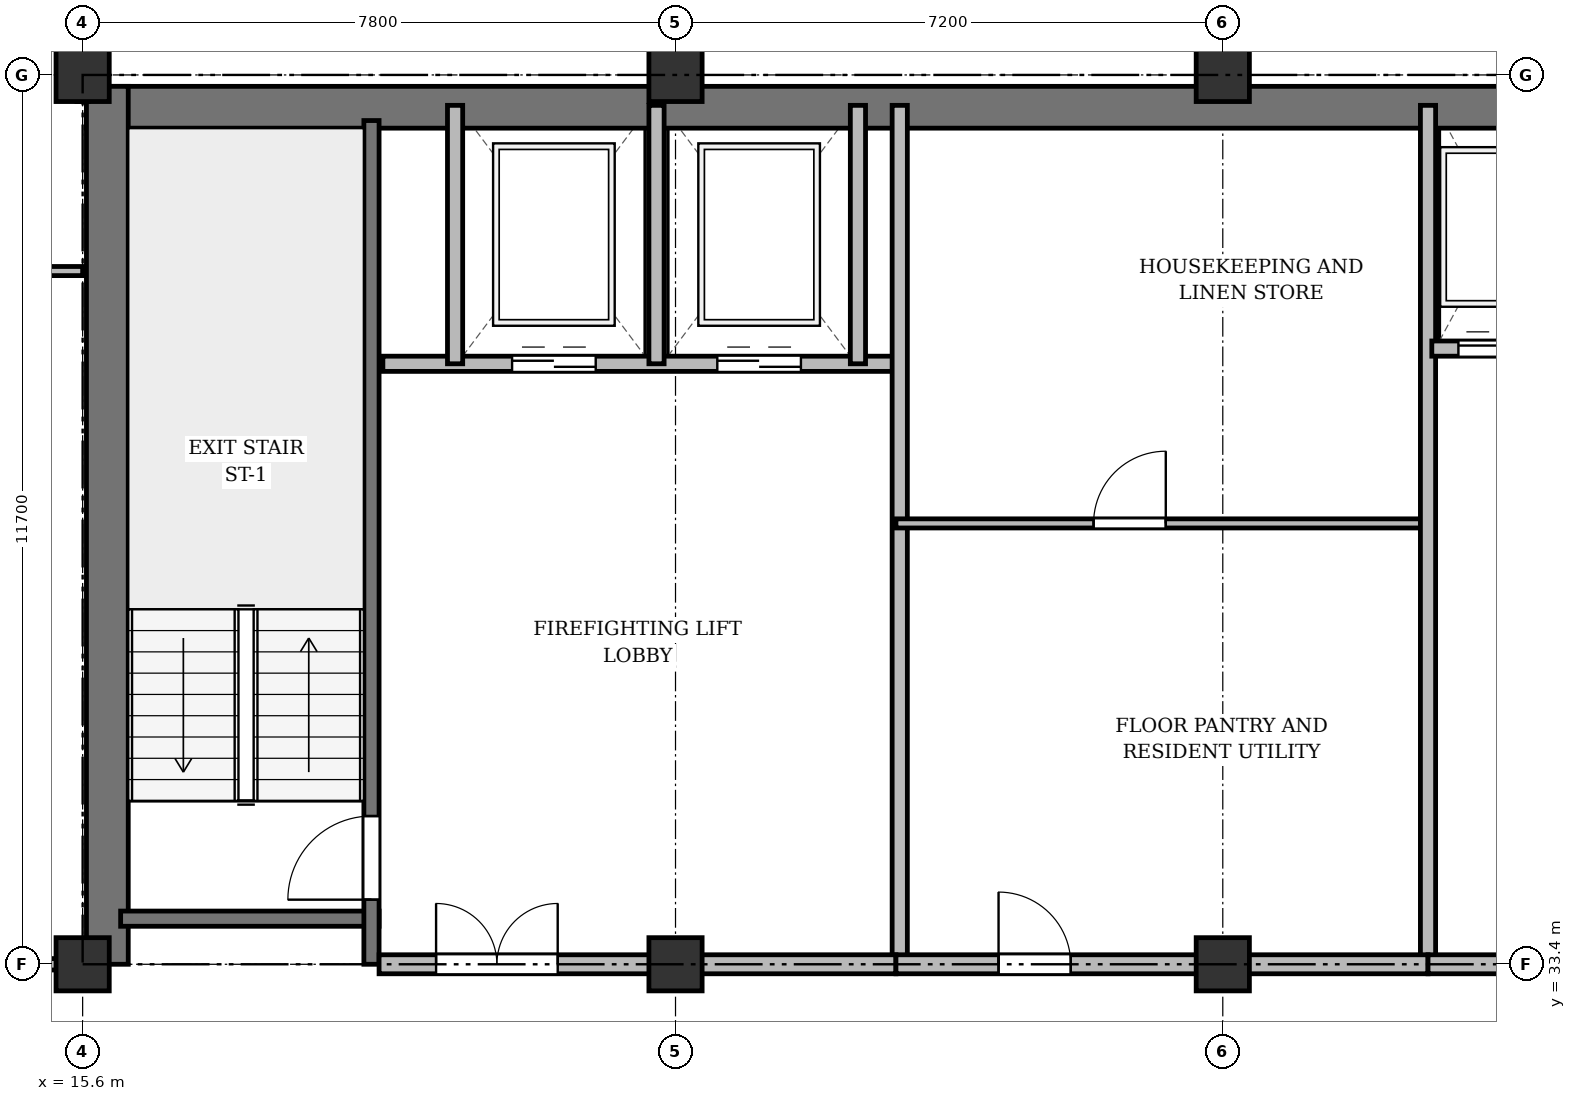
"""IFC4 building model, lengths in metres.
Left out: names, types, materials, properties, quantities, classifications, styles, units other than length and angle.
Written with IfcOpenShell. Run it as: python <this file> out.ifc"""

import sys

from ifc_helpers import new_model, si_unit, direction, frame, frame_2d, origin, origin_2d, place, context, subcontext, project, spatial, rectangle, extrude, source, transform, mapped, element, fill, save


model = new_model("IFC4")
c1 = context("Model", 3, precision=1e-05, world=origin(), true_north=direction((0.0, 1.0)))
c2 = subcontext(c1, "Body", "Model", "MODEL_VIEW")
j1 = project(units=[si_unit("LENGTHUNIT", "METRE"), si_unit("PLANEANGLEUNIT", "RADIAN")], contexts=[c1])
p1 = place(None, origin())
s1 = spatial("IfcSite", under=j1, at=p1, CompositionType="ELEMENT")
p2 = place(p1, origin())
s2 = spatial("IfcBuilding", under=s1, at=p2, CompositionType="ELEMENT")
p3 = place(p2, frame((0.0, 0.0, 197.7)))
s3 = spatial("IfcBuildingStorey", under=s2, at=p3, CompositionType="ELEMENT", Elevation=197.7)
m1 = source(origin(), c2, "Body", "SweptSolid", [
    extrude(rectangle(XDim=0.7, YDim=0.7, at=origin_2d()), origin(), (0.0, 0.0, 1.0), 3.6),
])
for number, where, z_axis, x_axis in (
    (1, (15.6, 33.4, 0.0), (0.0, 0.0, 1.0), (1.0, 0.0, 0.0)),
    (2, (15.6, 45.1, 0.0), (0.0, 0.0, 1.0), (1.0, 0.0, 0.0)),
    (3, (23.4, 33.4, 0.0), (0.0, 0.0, 1.0), (1.0, 0.0, 0.0)),
    (4, (23.4, 45.1, 0.0), (0.0, 0.0, 1.0), (1.0, 0.0, 0.0)),
    (5, (30.6, 33.4, 0.0), (0.0, 0.0, 1.0), (1.0, 0.0, 0.0)),
    (6, (30.6, 45.1, 0.0), (0.0, 0.0, 1.0), (1.0, 0.0, 0.0)),
):
    element("IfcColumn", number, at=place(p3, frame(where, z_axis=z_axis, x_axis=x_axis)), inside=s3, PredefinedType="COLUMN", context=c2, shape_type="MappedRepresentation", body=[
        mapped(m1, transform((0.0, 0.0, 0.0), x_axis=(1.0, 0.0, 0.0), y_axis=(0.0, 1.0, 0.0), z_axis=(0.0, 0.0, 1.0), scale=1.0)),
    ])
p4 = place(p3, frame((15.65, 44.675, 0.0), z_axis=(0.0, 0.0, 1.0), x_axis=(1.0, 0.0, 0.0)))
e7 = element("IfcWall", 7, at=p4, inside=s3, PredefinedType="SHEAR", context=c2, shape_type="SweptSolid", body=[
    extrude(rectangle(XDim=43.1, YDim=0.55, at=frame_2d((21.55, 0.0))), origin(), (0.0, 0.0, 1.0), 3.36),
])
p5 = place(p3, frame((15.925, 33.4, 0.0), z_axis=(0.0, 0.0, 1.0), x_axis=(0.0, 1.0, 0.0)))
e8 = element("IfcWall", 8, at=p5, inside=s3, PredefinedType="SHEAR", context=c2, shape_type="SweptSolid", body=[
    extrude(rectangle(XDim=11.55, YDim=0.55, at=frame_2d((5.775, 0.0))), origin(), (0.0, 0.0, 1.0), 3.36),
])
p6 = place(p3, frame((16.1, 34.0, 0.0), z_axis=(0.0, 0.0, 1.0), x_axis=(1.0, 0.0, 0.0)))
e9 = element("IfcWall", 9, at=p6, inside=s3, PredefinedType="SHEAR", context=c2, shape_type="SweptSolid", body=[
    extrude(rectangle(XDim=3.4, YDim=0.2, at=frame_2d((1.7, 0.0))), origin(), (0.0, 0.0, 1.0), 3.36),
])
p7 = place(p3, frame((19.4, 33.4, 0.0), z_axis=(0.0, 0.0, 1.0), x_axis=(0.0, 1.0, 0.0)))
e10 = element("IfcWall", 10, at=p7, inside=s3, PredefinedType="SHEAR", context=c2, shape_type="SweptSolid", body=[
    extrude(rectangle(XDim=11.1, YDim=0.2, at=frame_2d((5.55, 0.0))), origin(), (0.0, 0.0, 1.0), 3.36),
])
p8 = place(p7, frame((0.85, 0.0, 0.0)))
e11 = element("IfcOpeningElement", 11, at=p8, cuts=e10, PredefinedType="OPENING", context=c2, shape_type="SweptSolid", body=[
    extrude(rectangle(XDim=1.1, YDim=2.15, at=frame_2d((0.55, 1.075))), frame((0.0, 0.11, 0.0), z_axis=(0.0, -1.0, 0.0), x_axis=(1.0, 0.0, 0.0)), (0.0, 0.0, 1.0), 0.22),
])
p9 = place(p3, frame((19.55, 41.3, 0.0), z_axis=(0.0, 0.0, 1.0), x_axis=(1.0, 0.0, 0.0)))
e12 = element("IfcWall", 12, at=p9, inside=s3, PredefinedType="SOLIDWALL", context=c2, shape_type="SweptSolid", body=[
    extrude(rectangle(XDim=6.75, YDim=0.2, at=frame_2d((3.375, 0.0))), origin(), (0.0, 0.0, 1.0), 3.36),
])
p10 = place(p9, frame((1.7, 0.0, 0.0)))
e13 = element("IfcOpeningElement", 13, at=p10, cuts=e12, PredefinedType="OPENING", context=c2, shape_type="SweptSolid", body=[
    extrude(rectangle(XDim=1.1, YDim=2.15, at=frame_2d((0.55, 1.075))), frame((0.0, 0.11, 0.0), z_axis=(0.0, -1.0, 0.0), x_axis=(1.0, 0.0, 0.0)), (0.0, 0.0, 1.0), 0.22),
])
p11 = place(p9, frame((4.4, 0.0, 0.0)))
e14 = element("IfcOpeningElement", 14, at=p11, cuts=e12, PredefinedType="OPENING", context=c2, shape_type="SweptSolid", body=[
    extrude(rectangle(XDim=1.1, YDim=2.15, at=frame_2d((0.55, 1.075))), frame((0.0, 0.11, 0.0), z_axis=(0.0, -1.0, 0.0), x_axis=(1.0, 0.0, 0.0)), (0.0, 0.0, 1.0), 0.22),
])
for number, where, z_axis, x_axis in (
    (15, (20.5, 41.3, 0.0), (0.0, 0.0, 1.0), (0.0, 1.0, 0.0)),
    (16, (23.15, 41.3, 0.0), (0.0, 0.0, 1.0), (0.0, 1.0, 0.0)),
    (17, (25.8, 41.3, 0.0), (0.0, 0.0, 1.0), (0.0, 1.0, 0.0)),
):
    element("IfcWall", number, at=place(p3, frame(where, z_axis=z_axis, x_axis=x_axis)), inside=s3, PredefinedType="SOLIDWALL", context=c2, shape_type="SweptSolid", body=[
        extrude(rectangle(XDim=3.4, YDim=0.2, at=frame_2d((1.7, 0.0))), origin(), (0.0, 0.0, 1.0), 3.36),
    ])
p12 = place(p3, frame((26.35, 33.4, 0.0), z_axis=(0.0, 0.0, 1.0), x_axis=(0.0, 1.0, 0.0)))
e18 = element("IfcWall", 18, at=p12, inside=s3, PredefinedType="SOLIDWALL", context=c2, shape_type="SweptSolid", body=[
    extrude(rectangle(XDim=11.3, YDim=0.2, at=frame_2d((5.65, 0.0))), origin(), (0.0, 0.0, 1.0), 2.91),
])
p13 = place(p3, frame((19.5, 33.4, 0.0), z_axis=(0.0, 0.0, 1.0), x_axis=(1.0, 0.0, 0.0)))
e19 = element("IfcWall", 19, at=p13, inside=s3, PredefinedType="PARTITIONING", context=c2, shape_type="SweptSolid", body=[
    extrude(rectangle(XDim=6.8, YDim=0.25, at=frame_2d((3.4, 0.0))), origin(), (0.0, 0.0, 1.0), 2.91),
])
p14 = place(p13, frame((0.75, 0.0, 0.0)))
e20 = element("IfcOpeningElement", 20, at=p14, cuts=e19, PredefinedType="OPENING", context=c2, shape_type="SweptSolid", body=[
    extrude(rectangle(XDim=1.6, YDim=2.2, at=frame_2d((0.8, 1.1))), frame((0.0, 0.135, 0.0), z_axis=(0.0, -1.0, 0.0), x_axis=(1.0, 0.0, 0.0)), (0.0, 0.0, 1.0), 0.27),
])
p15 = place(p3, frame((26.3, 39.2, 0.0), z_axis=(0.0, 0.0, 1.0), x_axis=(1.0, 0.0, 0.0)))
e21 = element("IfcWall", 21, at=p15, inside=s3, PredefinedType="PARTITIONING", context=c2, shape_type="SweptSolid", body=[
    extrude(rectangle(XDim=7.0, YDim=0.12, at=frame_2d((3.5, 0.0))), origin(), (0.0, 0.0, 1.0), 2.86),
])
p16 = place(p15, frame((2.6, 0.0, 0.0)))
e22 = element("IfcOpeningElement", 22, at=p16, cuts=e21, PredefinedType="OPENING", context=c2, shape_type="SweptSolid", body=[
    extrude(rectangle(XDim=0.95, YDim=2.15, at=frame_2d((0.475, 1.075))), frame((0.0, 0.07, 0.0), z_axis=(0.0, -1.0, 0.0), x_axis=(1.0, 0.0, 0.0)), (0.0, 0.0, 1.0), 0.14),
])
p17 = place(p3, frame((33.3, 33.4, 0.0), z_axis=(0.0, 0.0, 1.0), x_axis=(0.0, 1.0, 0.0)))
e23 = element("IfcWall", 23, at=p17, inside=s3, PredefinedType="SOLIDWALL", context=c2, shape_type="SweptSolid", body=[
    extrude(rectangle(XDim=11.3, YDim=0.2, at=frame_2d((5.65, 0.0))), origin(), (0.0, 0.0, 1.0), 2.91),
])
p18 = place(p3, frame((33.35, 41.5, 0.0), z_axis=(0.0, 0.0, 1.0), x_axis=(1.0, 0.0, 0.0)))
e24 = element("IfcWall", 24, at=p18, inside=s3, PredefinedType="SOLIDWALL", context=c2, shape_type="SweptSolid", body=[
    extrude(rectangle(XDim=6.9, YDim=0.2, at=frame_2d((3.45, 0.0))), origin(), (0.0, 0.0, 1.0), 3.36),
])
p19 = place(p18, frame((0.35, 0.0, 0.0)))
e25 = element("IfcOpeningElement", 25, at=p19, cuts=e24, PredefinedType="OPENING", context=c2, shape_type="SweptSolid", body=[
    extrude(rectangle(XDim=1.05, YDim=2.15, at=frame_2d((0.525, 1.075))), frame((0.0, 0.11, 0.0), z_axis=(0.0, -1.0, 0.0), x_axis=(1.0, 0.0, 0.0)), (0.0, 0.0, 1.0), 0.22),
])
p20 = place(p18, frame((2.05, 0.0, 0.0)))
e26 = element("IfcOpeningElement", 26, at=p20, cuts=e24, PredefinedType="OPENING", context=c2, shape_type="SweptSolid", body=[
    extrude(rectangle(XDim=1.05, YDim=2.15, at=frame_2d((0.525, 1.075))), frame((0.0, 0.11, 0.0), z_axis=(0.0, -1.0, 0.0), x_axis=(1.0, 0.0, 0.0)), (0.0, 0.0, 1.0), 0.22),
])
p21 = place(p18, frame((3.75, 0.0, 0.0)))
e27 = element("IfcOpeningElement", 27, at=p21, cuts=e24, PredefinedType="OPENING", context=c2, shape_type="SweptSolid", body=[
    extrude(rectangle(XDim=1.05, YDim=2.15, at=frame_2d((0.525, 1.075))), frame((0.0, 0.11, 0.0), z_axis=(0.0, -1.0, 0.0), x_axis=(1.0, 0.0, 0.0)), (0.0, 0.0, 1.0), 0.22),
])
p22 = place(p18, frame((5.45, 0.0, 0.0)))
e28 = element("IfcOpeningElement", 28, at=p22, cuts=e24, PredefinedType="OPENING", context=c2, shape_type="SweptSolid", body=[
    extrude(rectangle(XDim=1.05, YDim=2.15, at=frame_2d((0.525, 1.075))), frame((0.0, 0.11, 0.0), z_axis=(0.0, -1.0, 0.0), x_axis=(1.0, 0.0, 0.0)), (0.0, 0.0, 1.0), 0.22),
])
p23 = place(p3, frame((26.3, 33.4, 0.0), z_axis=(0.0, 0.0, 1.0), x_axis=(1.0, 0.0, 0.0)))
e29 = element("IfcWall", 29, at=p23, inside=s3, PredefinedType="PARTITIONING", context=c2, shape_type="SweptSolid", body=[
    extrude(rectangle(XDim=7.0, YDim=0.25, at=frame_2d((3.5, 0.0))), origin(), (0.0, 0.0, 1.0), 2.91),
])
p24 = place(p23, frame((1.35, 0.0, 0.0)))
e30 = element("IfcOpeningElement", 30, at=p24, cuts=e29, PredefinedType="OPENING", context=c2, shape_type="SweptSolid", body=[
    extrude(rectangle(XDim=0.95, YDim=2.15, at=frame_2d((0.475, 1.075))), frame((0.0, 0.135, 0.0), z_axis=(0.0, -1.0, 0.0), x_axis=(1.0, 0.0, 0.0)), (0.0, 0.0, 1.0), 0.27),
])
p25 = place(p3, frame((33.3, 33.4, 0.0), z_axis=(0.0, 0.0, 1.0), x_axis=(1.0, 0.0, 0.0)))
e31 = element("IfcWall", 31, at=p25, inside=s3, PredefinedType="PARTITIONING", context=c2, shape_type="SweptSolid", body=[
    extrude(rectangle(XDim=13.85, YDim=0.25, at=frame_2d((6.925, 0.0))), origin(), (0.0, 0.0, 1.0), 2.91),
])
p26 = place(p25, frame((4.2, 0.0, 0.0)))
e32 = element("IfcOpeningElement", 32, at=p26, cuts=e31, PredefinedType="OPENING", context=c2, shape_type="SweptSolid", body=[
    extrude(rectangle(XDim=1.6, YDim=2.2, at=frame_2d((0.8, 1.1))), frame((0.0, 0.135, 0.0), z_axis=(0.0, -1.0, 0.0), x_axis=(1.0, 0.0, 0.0)), (0.0, 0.0, 1.0), 0.27),
])
p27 = place(p3, frame((11.925, 42.52, 0.0), z_axis=(0.0, 0.0, 1.0), x_axis=(1.0, 0.0, 0.0)))
e33 = element("IfcWall", 33, at=p27, inside=s3, PredefinedType="PARTITIONING", context=c2, shape_type="SweptSolid", body=[
    extrude(rectangle(XDim=3.675, YDim=0.12, at=frame_2d((1.837, 0.0))), origin(), (0.0, 0.0, 1.0), 2.86),
])
p28 = place(p27, frame((1.362, 0.0, 0.0)))
e34 = element("IfcOpeningElement", 34, at=p28, cuts=e33, PredefinedType="OPENING", context=c2, shape_type="SweptSolid", body=[
    extrude(rectangle(XDim=0.95, YDim=2.15, at=frame_2d((0.475, 1.075))), frame((0.0, 0.07, 0.0), z_axis=(0.0, -1.0, 0.0), x_axis=(1.0, 0.0, 0.0)), (0.0, 0.0, 1.0), 0.14),
])
p29 = place(p3, frame((8.25, 33.4, 0.0), z_axis=(0.0, 0.0, 1.0), x_axis=(1.0, 0.0, 0.0)))
e35 = element("IfcWall", 35, at=p29, inside=s3, PredefinedType="PARTITIONING", context=c2, shape_type="SweptSolid", body=[
    extrude(rectangle(XDim=7.35, YDim=0.15, at=frame_2d((3.675, 0.0))), origin(), (0.0, 0.0, 1.0), 2.91),
])
p30 = place(p29, frame((4.275, 0.0, 0.0)))
e36 = element("IfcOpeningElement", 36, at=p30, cuts=e35, PredefinedType="OPENING", context=c2, shape_type="SweptSolid", body=[
    extrude(rectangle(XDim=0.95, YDim=2.15, at=frame_2d((0.475, 1.075))), frame((0.0, 0.085, 0.0), z_axis=(0.0, -1.0, 0.0), x_axis=(1.0, 0.0, 0.0)), (0.0, 0.0, 1.0), 0.17),
])
p31 = place(p3, frame((15.6, 44.75, 0.0), z_axis=(0.0, 0.0, 1.0), x_axis=(0.0, 1.0, 0.0)))
e37 = element("IfcWall", 37, at=p31, inside=s3, PredefinedType="PARTITIONING", context=c2, shape_type="SweptSolid", body=[
    extrude(rectangle(XDim=3.61, YDim=0.15, at=frame_2d((1.805, 0.0))), origin(), (0.0, 0.0, 1.0), 2.86),
])
p32 = place(p31, frame((1.1, 0.0, 0.0)))
e38 = element("IfcOpeningElement", 38, at=p32, cuts=e37, PredefinedType="OPENING", context=c2, shape_type="SweptSolid", body=[
    extrude(rectangle(XDim=0.95, YDim=2.15, at=frame_2d((0.475, 1.075))), frame((0.0, 0.085, 0.0), z_axis=(0.0, -1.0, 0.0), x_axis=(1.0, 0.0, 0.0)), (0.0, 0.0, 1.0), 0.17),
])
m2 = source(origin(), c2, "Body", "SweptSolid", [
    extrude(rectangle(XDim=1.1, YDim=2.15, at=frame_2d((0.55, 1.075))), frame((0.0, 0.025, 0.0), z_axis=(0.0, -1.0, 0.0), x_axis=(1.0, 0.0, 0.0)), (0.0, 0.0, 1.0), 0.05),
])
p33 = place(p8, origin())
e39 = element("IfcDoor", 39, at=p33, inside=s3, OperationType="SINGLE_SWING_LEFT", PredefinedType="DOOR", context=c2, shape_type="MappedRepresentation", body=[
    mapped(m2, transform((0.0, 0.0, 0.0), x_axis=(1.0, 0.0, 0.0), y_axis=(0.0, 1.0, 0.0), z_axis=(0.0, 0.0, 1.0), scale=1.0)),
])
fill(e11, e39)
p34 = place(p10, origin())
e40 = element("IfcDoor", 40, at=p34, inside=s3, OperationType="DOUBLE_DOOR_SLIDING", PredefinedType="DOOR", context=c2, shape_type="MappedRepresentation", body=[
    mapped(m2, transform((0.0, 0.0, 0.0), x_axis=(1.0, 0.0, 0.0), y_axis=(0.0, 1.0, 0.0), z_axis=(0.0, 0.0, 1.0), scale=1.0)),
])
fill(e13, e40)
p35 = place(p11, origin())
e41 = element("IfcDoor", 41, at=p35, inside=s3, OperationType="DOUBLE_DOOR_SLIDING", PredefinedType="DOOR", context=c2, shape_type="MappedRepresentation", body=[
    mapped(m2, transform((0.0, 0.0, 0.0), x_axis=(1.0, 0.0, 0.0), y_axis=(0.0, 1.0, 0.0), z_axis=(0.0, 0.0, 1.0), scale=1.0)),
])
fill(e14, e41)
m3 = source(origin(), c2, "Body", "SweptSolid", [
    extrude(rectangle(XDim=1.6, YDim=2.2, at=frame_2d((0.8, 1.1))), frame((0.0, 0.025, 0.0), z_axis=(0.0, -1.0, 0.0), x_axis=(1.0, 0.0, 0.0)), (0.0, 0.0, 1.0), 0.05),
])
p36 = place(p14, origin())
e42 = element("IfcDoor", 42, at=p36, inside=s3, OperationType="DOUBLE_DOOR_SINGLE_SWING", PredefinedType="DOOR", context=c2, shape_type="MappedRepresentation", body=[
    mapped(m3, transform((0.0, 0.0, 0.0), x_axis=(1.0, 0.0, 0.0), y_axis=(0.0, 1.0, 0.0), z_axis=(0.0, 0.0, 1.0), scale=1.0)),
])
fill(e20, e42)
m4 = source(origin(), c2, "Body", "SweptSolid", [
    extrude(rectangle(XDim=0.95, YDim=2.15, at=frame_2d((0.475, 1.075))), frame((0.0, 0.025, 0.0), z_axis=(0.0, -1.0, 0.0), x_axis=(1.0, 0.0, 0.0)), (0.0, 0.0, 1.0), 0.05),
])
p37 = place(p16, origin())
e43 = element("IfcDoor", 43, at=p37, inside=s3, OperationType="SINGLE_SWING_RIGHT", PredefinedType="DOOR", context=c2, shape_type="MappedRepresentation", body=[
    mapped(m4, transform((0.0, 0.0, 0.0), x_axis=(1.0, 0.0, 0.0), y_axis=(0.0, 1.0, 0.0), z_axis=(0.0, 0.0, 1.0), scale=1.0)),
])
fill(e22, e43)
m5 = source(origin(), c2, "Body", "SweptSolid", [
    extrude(rectangle(XDim=1.05, YDim=2.15, at=frame_2d((0.525, 1.075))), frame((0.0, 0.025, 0.0), z_axis=(0.0, -1.0, 0.0), x_axis=(1.0, 0.0, 0.0)), (0.0, 0.0, 1.0), 0.05),
])
p38 = place(p19, origin())
e44 = element("IfcDoor", 44, at=p38, inside=s3, OperationType="DOUBLE_DOOR_SLIDING", PredefinedType="DOOR", context=c2, shape_type="MappedRepresentation", body=[
    mapped(m5, transform((0.0, 0.0, 0.0), x_axis=(1.0, 0.0, 0.0), y_axis=(0.0, 1.0, 0.0), z_axis=(0.0, 0.0, 1.0), scale=1.0)),
])
fill(e25, e44)
p39 = place(p24, origin())
e45 = element("IfcDoor", 45, at=p39, inside=s3, OperationType="SINGLE_SWING_LEFT", PredefinedType="DOOR", context=c2, shape_type="MappedRepresentation", body=[
    mapped(m4, transform((0.0, 0.0, 0.0), x_axis=(1.0, 0.0, 0.0), y_axis=(0.0, 1.0, 0.0), z_axis=(0.0, 0.0, 1.0), scale=1.0)),
])
fill(e30, e45)
save(model, sys.argv[1])
